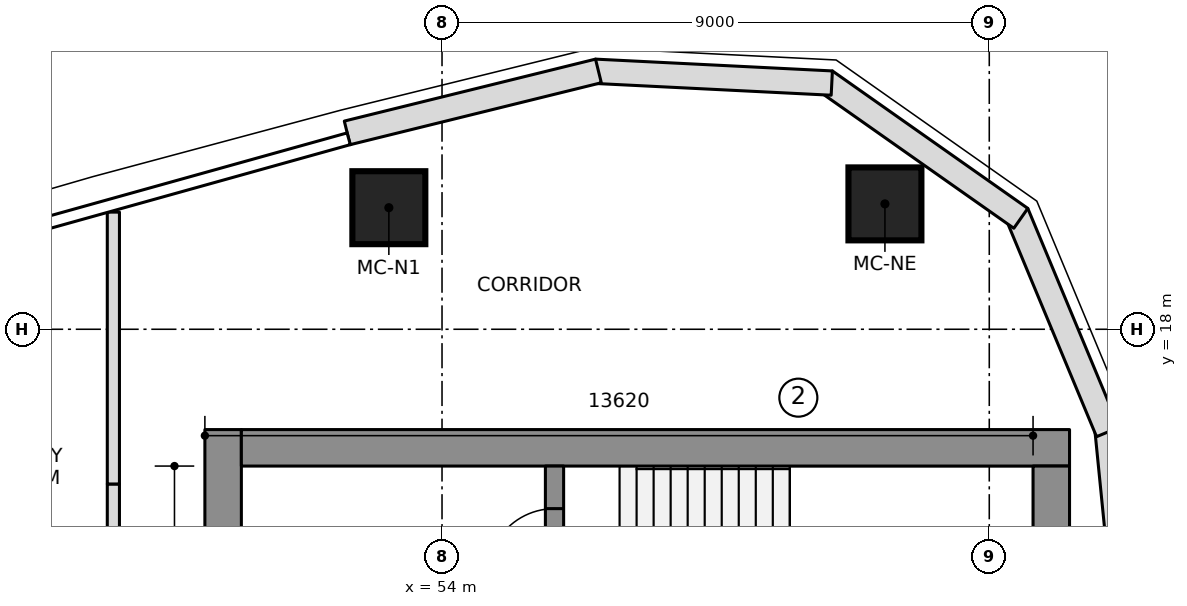
"""IFC4 building model, lengths in metres.
Left out: names, types, materials, properties, quantities, classifications, styles, units other than length and angle.
Written with IfcOpenShell. Run it as: python <this file> out.ifc"""

import sys

from ifc_helpers import new_model, si_unit, direction, frame, frame_2d, origin, origin_2d, place, context, subcontext, project, spatial, polyline, rectangle, outline, extrude, element, fill, save


model = new_model("IFC4")
c1 = context("Model", 3, precision=1e-05, world=origin(), true_north=direction((0.0, 1.0)))
c2 = subcontext(c1, "Body", "Model", "MODEL_VIEW")
j1 = project(units=[si_unit("LENGTHUNIT", "METRE"), si_unit("PLANEANGLEUNIT", "RADIAN")], contexts=[c1])
p1 = place(None, origin())
s1 = spatial("IfcSite", under=j1, at=p1, CompositionType="ELEMENT")
p2 = place(p1, origin())
s2 = spatial("IfcBuilding", under=s1, at=p2, CompositionType="ELEMENT")
p3 = place(p2, frame((0.0, 0.0, 220.8)))
s3 = spatial("IfcBuildingStorey", under=s2, at=p3, CompositionType="ELEMENT", Elevation=220.8)
p4 = place(p3, frame((50.4, 6.65, 0.0), z_axis=(0.0, 0.0, 1.0), x_axis=(0.0, 1.0, 0.0)))
e1 = element("IfcWall", 1, at=p4, inside=s3, PredefinedType="SHEAR", context=c2, shape_type="SweptSolid", body=[
    extrude(rectangle(XDim=9.7, YDim=0.6, at=frame_2d((4.85, 0.0))), origin(), (0.0, 0.0, 1.0), 3.55),
])
p5 = place(p4, frame((6.5, 0.0, 0.0)))
e2 = element("IfcOpeningElement", 2, at=p5, cuts=e1, PredefinedType="OPENING", context=c2, shape_type="SweptSolid", body=[
    extrude(rectangle(XDim=1.1, YDim=2.1, at=frame_2d((0.55, 1.05))), frame((0.0, 0.31, 0.0), z_axis=(0.0, -1.0, 0.0), x_axis=(1.0, 0.0, 0.0)), (0.0, 0.0, 1.0), 0.62),
])
p6 = place(p3, frame((50.7, 16.05, 0.0), z_axis=(0.0, 0.0, 1.0), x_axis=(1.0, 0.0, 0.0)))
e3 = element("IfcWall", 3, at=p6, inside=s3, PredefinedType="SHEAR", context=c2, shape_type="SweptSolid", body=[
    extrude(rectangle(XDim=13.62, YDim=0.6, at=frame_2d((6.81, 0.0))), origin(), (0.0, 0.0, 1.0), 3.55),
])
p7 = place(p3, frame((64.02, 7.502, 0.0), z_axis=(0.0, 0.0, 1.0), x_axis=(0.0, 1.0, 0.0)))
e4 = element("IfcWall", 4, at=p7, inside=s3, PredefinedType="SHEAR", context=c2, shape_type="SweptSolid", body=[
    extrude(rectangle(XDim=8.248, YDim=0.6, at=frame_2d((4.124, 0.0))), origin(), (0.0, 0.0, 1.0), 3.55),
])
p8 = place(p3, frame((55.85, 10.35, 0.0), z_axis=(0.0, 0.0, 1.0), x_axis=(0.0, 1.0, 0.0)))
e5 = element("IfcWall", 5, at=p8, inside=s3, PredefinedType="SHEAR", context=c2, shape_type="SweptSolid", body=[
    extrude(rectangle(XDim=5.4, YDim=0.3, at=frame_2d((2.7, 0.0))), origin(), (0.0, 0.0, 1.0), 3.55),
])
p9 = place(p8, frame((1.43, 0.0, 0.0)))
e6 = element("IfcOpeningElement", 6, at=p9, cuts=e5, PredefinedType="OPENING", context=c2, shape_type="SweptSolid", body=[
    extrude(rectangle(XDim=1.1, YDim=2.1, at=frame_2d((0.55, 1.05))), frame((0.0, 0.16, 0.0), z_axis=(0.0, -1.0, 0.0), x_axis=(1.0, 0.0, 0.0)), (0.0, 0.0, 1.0), 0.32),
])
p10 = place(p8, frame((3.6, 0.0, 0.0)))
e7 = element("IfcOpeningElement", 7, at=p10, cuts=e5, PredefinedType="OPENING", context=c2, shape_type="SweptSolid", body=[
    extrude(rectangle(XDim=1.1, YDim=2.1, at=frame_2d((0.55, 1.05))), frame((0.0, 0.16, 0.0), z_axis=(0.0, -1.0, 0.0), x_axis=(1.0, 0.0, 0.0)), (0.0, 0.0, 1.0), 0.32),
])
for number, where, z_axis, x_axis in (
    (8, (61.284, 20.062, 0.0), (0.0, 0.0, 1.0), (1.0, 0.0, 0.0)),
    (9, (53.125, 20.0, 0.0), (0.0, 0.0, 1.0), (1.0, 0.0, 0.0)),
):
    element("IfcColumn", number, at=place(p3, frame(where, z_axis=z_axis, x_axis=x_axis)), inside=s3, PredefinedType="COLUMN", context=c2, shape_type="SweptSolid", body=[
        extrude(rectangle(XDim=1.2, YDim=1.2, at=origin_2d()), origin(), (0.0, 0.0, 1.0), 3.55),
    ])
p11 = place(p3, frame((65.342, 12.264, 0.0), z_axis=(0.0, 0.0, 1.0), x_axis=(-0.098718218066, 0.995115427185, 0.0)))
e10 = element("IfcWall", 10, at=p11, inside=s3, PredefinedType="NOTDEFINED", context=c2, shape_type="SweptSolid", body=[
    extrude(outline(polyline([(-0.003, -0.2), (4.123, -0.2), (4.063, 0.2), (0.003, 0.2), (-0.003, -0.2)])), origin(), (0.0, 0.0, 1.0), 3.25),
])
p12 = place(p3, frame((64.938, 16.337, 0.0), z_axis=(0.0, 0.0, 1.0), x_axis=(-0.3844335483, 0.923152667191, 0.0)))
e11 = element("IfcWall", 11, at=p12, inside=s3, PredefinedType="NOTDEFINED", context=c2, shape_type="SweptSolid", body=[
    extrude(outline(polyline([(-0.03, -0.2), (3.871, -0.2), (3.756, 0.2), (0.03, 0.2), (-0.03, -0.2)])), origin(), (0.0, 0.0, 1.0), 3.25),
])
p13 = place(p3, frame((63.471, 19.858, 0.0), z_axis=(0.0, 0.0, 1.0), x_axis=(-0.817942545532, 0.575299915009, 0.0)))
e12 = element("IfcWall", 12, at=p13, inside=s3, PredefinedType="NOTDEFINED", context=c2, shape_type="SweptSolid", body=[
    extrude(outline(polyline([(-0.058, -0.2), (3.871, -0.2), (3.756, 0.2), (0.058, 0.2), (-0.058, -0.2)])), origin(), (0.0, 0.0, 1.0), 3.25),
])
p14 = place(p3, frame((60.352, 22.052, 0.0), z_axis=(0.0, 0.0, 1.0), x_axis=(-0.998758875872, 0.049806705046, 0.0)))
e13 = element("IfcWall", 13, at=p14, inside=s3, PredefinedType="NOTDEFINED", context=c2, shape_type="SweptSolid", body=[
    extrude(outline(polyline([(-0.058, -0.2), (3.843, -0.2), (3.784, 0.2), (0.058, 0.2), (-0.058, -0.2)])), origin(), (0.0, 0.0, 1.0), 3.25),
])
p15 = place(p3, frame((56.543, 22.242, 0.0), z_axis=(0.0, 0.0, 1.0), x_axis=(-0.970902342456, -0.23947576373, 0.0)))
e14 = element("IfcWall", 14, at=p15, inside=s3, PredefinedType="NOTDEFINED", context=c2, shape_type="SweptSolid", body=[
    extrude(outline(polyline([(-0.029, -0.2), (4.226, -0.2), (4.226, 0.2), (0.029, 0.2), (-0.029, -0.2)])), origin(), (0.0, 0.0, 1.0), 3.25),
])
p16 = place(p3, frame((48.595, 15.455, 0.0), z_axis=(0.0, 0.0, 1.0), x_axis=(0.0, -1.0, 0.0)))
e15 = element("IfcWall", 15, at=p16, inside=s3, PredefinedType="PARTITIONING", context=c2, shape_type="SweptSolid", body=[
    extrude(rectangle(XDim=5.322, YDim=0.2, at=frame_2d((2.661, 0.0))), origin(), (0.0, 0.0, 1.0), 3.25),
])
p17 = place(p16, frame((2.147, 0.0, 0.0)))
e16 = element("IfcOpeningElement", 16, at=p17, cuts=e15, PredefinedType="OPENING", context=c2, shape_type="SweptSolid", body=[
    extrude(rectangle(XDim=1.0, YDim=2.1, at=frame_2d((0.5, 1.05))), frame((0.0, 0.11, 0.0), z_axis=(0.0, -1.0, 0.0), x_axis=(1.0, 0.0, 0.0)), (0.0, 0.0, 1.0), 0.22),
])
p18 = place(p3, frame((48.595, 19.927, 0.0), z_axis=(0.0, 0.0, 1.0), x_axis=(0.0, -1.0, 0.0)))
e17 = element("IfcWall", 17, at=p18, inside=s3, PredefinedType="PARTITIONING", context=c2, shape_type="SweptSolid", body=[
    extrude(rectangle(XDim=4.472, YDim=0.2, at=frame_2d((2.236, 0.0))), origin(), (0.0, 0.0, 1.0), 3.25),
])
p19 = place(p10, origin())
e18 = element("IfcDoor", 18, at=p19, inside=s3, OperationType="SINGLE_SWING_RIGHT", PredefinedType="DOOR", context=c2, shape_type="SweptSolid", body=[
    extrude(rectangle(XDim=1.1, YDim=2.1, at=frame_2d((0.55, 1.05))), frame((0.0, 0.025, 0.0), z_axis=(0.0, -1.0, 0.0), x_axis=(1.0, 0.0, 0.0)), (0.0, 0.0, 1.0), 0.05),
])
fill(e7, e18)
save(model, sys.argv[1])
